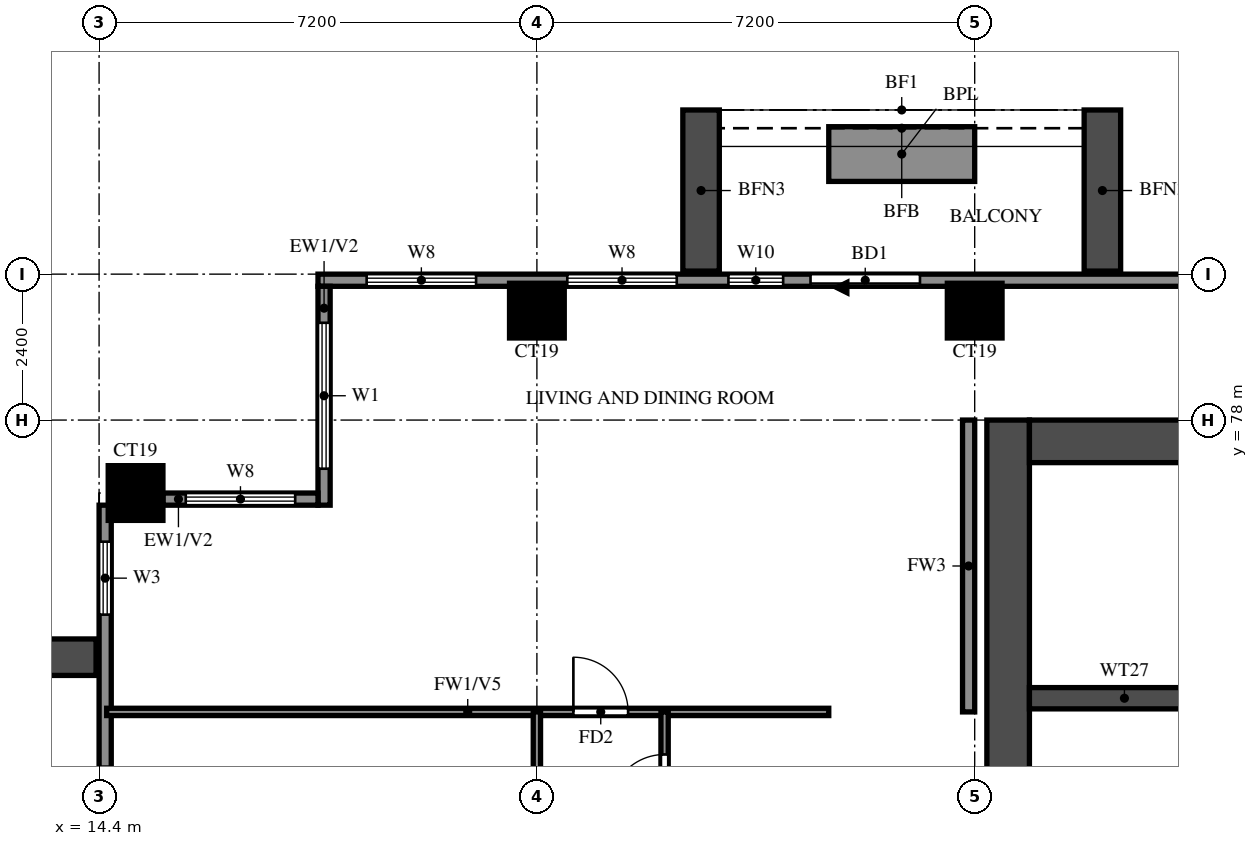
"""IFC4 building model, lengths in metres.
Left out: names, types, materials, properties, quantities, classifications, styles, units other than length and angle.
Written with IfcOpenShell. Run it as: python <this file> out.ifc"""

import sys

from ifc_helpers import new_model, si_unit, direction, frame, frame_2d, origin, origin_2d, place, context, subcontext, project, spatial, rectangle, extrude, source, transform, mapped, element, fill, save


model = new_model("IFC4")
c1 = context("Model", 3, precision=1e-05, world=origin(), true_north=direction((0.0, 1.0)))
c2 = subcontext(c1, "Body", "Model", "MODEL_VIEW")
j1 = project(units=[si_unit("LENGTHUNIT", "METRE"), si_unit("PLANEANGLEUNIT", "RADIAN")], contexts=[c1])
p1 = place(None, origin())
s1 = spatial("IfcSite", under=j1, at=p1, CompositionType="ELEMENT")
p2 = place(p1, origin())
s2 = spatial("IfcBuilding", under=s1, at=p2, CompositionType="ELEMENT")
p3 = place(p2, frame((0.0, 0.0, 123.5)))
s3 = spatial("IfcBuildingStorey", under=s2, at=p3, CompositionType="ELEMENT", Elevation=123.5)
m1 = source(origin(), c2, "Body", "SweptSolid", [
    extrude(rectangle(XDim=0.9, YDim=0.9, at=origin_2d()), origin(), (0.0, 0.0, 1.0), 3.2),
])
for number, where, z_axis, x_axis in (
    (1, (15.0, 76.8, 0.0), (0.0, 0.0, 1.0), (1.0, 0.0, 0.0)),
    (2, (21.6, 79.8, 0.0), (0.0, 0.0, 1.0), (1.0, 0.0, 0.0)),
    (3, (28.8, 79.8, 0.0), (0.0, 0.0, 1.0), (1.0, 0.0, 0.0)),
):
    element("IfcColumn", number, at=place(p3, frame(where, z_axis=z_axis, x_axis=x_axis)), inside=s3, PredefinedType="COLUMN", context=c2, shape_type="MappedRepresentation", body=[
        mapped(m1, transform((0.0, 0.0, 0.0))),
    ])
p4 = place(p3, frame((29.35, 66.1, 0.0), z_axis=(0.0, 0.0, 1.0), x_axis=(0.0, 1.0, 0.0)))
e4 = element("IfcWall", 4, at=p4, inside=s3, PredefinedType="SHEAR", context=c2, shape_type="SweptSolid", body=[
    extrude(rectangle(XDim=11.9, YDim=0.7, at=frame_2d((5.95, 0.0))), origin(), (0.0, 0.0, 1.0), 3.2),
])
p5 = place(p3, frame((29.7, 77.65, 0.0), z_axis=(0.0, 0.0, 1.0), x_axis=(1.0, 0.0, 0.0)))
e5 = element("IfcWall", 5, at=p5, inside=s3, PredefinedType="SHEAR", context=c2, shape_type="SweptSolid", body=[
    extrude(rectangle(XDim=41.4, YDim=0.7, at=frame_2d((20.7, 0.0))), origin(), (0.0, 0.0, 1.0), 3.2),
])
p6 = place(p3, frame((29.7, 73.425, 0.0), z_axis=(0.0, 0.0, 1.0), x_axis=(1.0, 0.0, 0.0)))
e6 = element("IfcWall", 6, at=p6, inside=s3, PredefinedType="SHEAR", context=c2, shape_type="SweptSolid", body=[
    extrude(rectangle(XDim=3.125, YDim=0.35, at=frame_2d((1.562, 0.0))), origin(), (0.0, 0.0, 1.0), 3.2),
])
p7 = place(p3, frame((82.6, 80.3, 0.0), z_axis=(0.0, 0.0, 1.0), x_axis=(-1.0, 0.0, 0.0)))
e7 = element("IfcWall", 7, at=p7, inside=s3, PredefinedType="SOLIDWALL", context=c2, shape_type="SweptSolid", body=[
    extrude(rectangle(XDim=64.6, YDim=0.2, at=frame_2d((32.3, 0.0))), origin(), (0.0, 0.0, 1.0), 3.2),
])
p8 = place(p7, frame((54.7, 0.0, 0.0)))
e8 = element("IfcOpeningElement", 8, at=p8, cuts=e7, PredefinedType="OPENING", context=c2, shape_type="SweptSolid", body=[
    extrude(rectangle(XDim=1.8, YDim=2.4, at=frame_2d((0.9, 1.2))), frame((0.0, 0.11, 0.0), z_axis=(0.0, -1.0, 0.0), x_axis=(1.0, 0.0, 0.0)), (0.0, 0.0, 1.0), 0.22),
])
p9 = place(p7, frame((56.95, 0.0, 0.6)))
e9 = element("IfcOpeningElement", 9, at=p9, cuts=e7, PredefinedType="OPENING", context=c2, shape_type="SweptSolid", body=[
    extrude(rectangle(XDim=0.9, YDim=2.4, at=frame_2d((0.45, 1.2))), frame((0.0, 0.11, 0.0), z_axis=(0.0, -1.0, 0.0), x_axis=(1.0, 0.0, 0.0)), (0.0, 0.0, 1.0), 0.22),
])
p10 = place(p7, frame((58.7, 0.0, 0.6)))
e10 = element("IfcOpeningElement", 10, at=p10, cuts=e7, PredefinedType="OPENING", context=c2, shape_type="SweptSolid", body=[
    extrude(rectangle(XDim=1.8, YDim=2.4, at=frame_2d((0.9, 1.2))), frame((0.0, 0.11, 0.0), z_axis=(0.0, -1.0, 0.0), x_axis=(1.0, 0.0, 0.0)), (0.0, 0.0, 1.0), 0.22),
])
p11 = place(p7, frame((62.0, 0.0, 0.6)))
e11 = element("IfcOpeningElement", 11, at=p11, cuts=e7, PredefinedType="OPENING", context=c2, shape_type="SweptSolid", body=[
    extrude(rectangle(XDim=1.8, YDim=2.4, at=frame_2d((0.9, 1.2))), frame((0.0, 0.11, 0.0), z_axis=(0.0, -1.0, 0.0), x_axis=(1.0, 0.0, 0.0)), (0.0, 0.0, 1.0), 0.22),
])
p12 = place(p7, frame((0.7, 0.0, 0.6)))
e12 = element("IfcOpeningElement", 12, at=p12, cuts=e7, PredefinedType="OPENING", context=c2, shape_type="SweptSolid", body=[
    extrude(rectangle(XDim=1.8, YDim=2.4, at=frame_2d((0.9, 1.2))), frame((0.0, 0.11, 0.0), z_axis=(0.0, -1.0, 0.0), x_axis=(1.0, 0.0, 0.0)), (0.0, 0.0, 1.0), 0.22),
])
p13 = place(p7, frame((4.367, 0.0, 0.6)))
e13 = element("IfcOpeningElement", 13, at=p13, cuts=e7, PredefinedType="OPENING", context=c2, shape_type="SweptSolid", body=[
    extrude(rectangle(XDim=2.4, YDim=2.4, at=frame_2d((1.2, 1.2))), frame((0.0, 0.11, 0.0), z_axis=(0.0, -1.0, 0.0), x_axis=(1.0, 0.0, 0.0)), (0.0, 0.0, 1.0), 0.22),
])
p14 = place(p7, frame((7.233, 0.0, 0.6)))
e14 = element("IfcOpeningElement", 14, at=p14, cuts=e7, PredefinedType="OPENING", context=c2, shape_type="SweptSolid", body=[
    extrude(rectangle(XDim=2.4, YDim=2.4, at=frame_2d((1.2, 1.2))), frame((0.0, 0.11, 0.0), z_axis=(0.0, -1.0, 0.0), x_axis=(1.0, 0.0, 0.0)), (0.0, 0.0, 1.0), 0.22),
])
p15 = place(p3, frame((18.1, 80.2, 0.0), z_axis=(0.0, 0.0, 1.0), x_axis=(0.0, -1.0, 0.0)))
e15 = element("IfcWall", 15, at=p15, inside=s3, PredefinedType="SOLIDWALL", context=c2, shape_type="SweptSolid", body=[
    extrude(rectangle(XDim=3.6, YDim=0.2, at=frame_2d((1.8, 0.0))), origin(), (0.0, 0.0, 1.0), 3.2),
])
p16 = place(p15, frame((0.6, 0.0, 0.6)))
e16 = element("IfcOpeningElement", 16, at=p16, cuts=e15, PredefinedType="OPENING", context=c2, shape_type="SweptSolid", body=[
    extrude(rectangle(XDim=2.4, YDim=2.4, at=frame_2d((1.2, 1.2))), frame((0.0, 0.11, 0.0), z_axis=(0.0, -1.0, 0.0), x_axis=(1.0, 0.0, 0.0)), (0.0, 0.0, 1.0), 0.22),
])
p17 = place(p3, frame((18.0, 76.7, 0.0), z_axis=(0.0, 0.0, 1.0), x_axis=(-1.0, 0.0, 0.0)))
e17 = element("IfcWall", 17, at=p17, inside=s3, PredefinedType="SOLIDWALL", context=c2, shape_type="SweptSolid", body=[
    extrude(rectangle(XDim=2.55, YDim=0.2, at=frame_2d((1.275, 0.0))), origin(), (0.0, 0.0, 1.0), 3.2),
])
p18 = place(p17, frame((0.375, 0.0, 0.6)))
e18 = element("IfcOpeningElement", 18, at=p18, cuts=e17, PredefinedType="OPENING", context=c2, shape_type="SweptSolid", body=[
    extrude(rectangle(XDim=1.8, YDim=2.4, at=frame_2d((0.9, 1.2))), frame((0.0, 0.11, 0.0), z_axis=(0.0, -1.0, 0.0), x_axis=(1.0, 0.0, 0.0)), (0.0, 0.0, 1.0), 0.22),
])
p19 = place(p3, frame((14.5, 76.6, 0.0), z_axis=(0.0, 0.0, 1.0), x_axis=(0.0, -1.0, 0.0)))
e19 = element("IfcWall", 19, at=p19, inside=s3, PredefinedType="SOLIDWALL", context=c2, shape_type="SweptSolid", body=[
    extrude(rectangle(XDim=33.4, YDim=0.2, at=frame_2d((16.7, 0.0))), origin(), (0.0, 0.0, 1.0), 3.2),
])
p20 = place(p19, frame((4.3, 0.0, 0.0)))
e20 = element("IfcOpeningElement", 20, at=p20, cuts=e19, PredefinedType="OPENING", context=c2, shape_type="SweptSolid", body=[
    extrude(rectangle(XDim=1.8, YDim=2.4, at=frame_2d((0.9, 1.2))), frame((0.0, 0.11, 0.0), z_axis=(0.0, -1.0, 0.0), x_axis=(1.0, 0.0, 0.0)), (0.0, 0.0, 1.0), 0.22),
])
p21 = place(p19, frame((18.7, 0.0, 0.0)))
e21 = element("IfcOpeningElement", 21, at=p21, cuts=e19, PredefinedType="OPENING", context=c2, shape_type="SweptSolid", body=[
    extrude(rectangle(XDim=1.8, YDim=2.4, at=frame_2d((0.9, 1.2))), frame((0.0, 0.11, 0.0), z_axis=(0.0, -1.0, 0.0), x_axis=(1.0, 0.0, 0.0)), (0.0, 0.0, 1.0), 0.22),
])
p22 = place(p19, frame((29.9, 0.0, 0.6)))
e22 = element("IfcOpeningElement", 22, at=p22, cuts=e19, PredefinedType="OPENING", context=c2, shape_type="SweptSolid", body=[
    extrude(rectangle(XDim=2.4, YDim=2.4, at=frame_2d((1.2, 1.2))), frame((0.0, 0.11, 0.0), z_axis=(0.0, -1.0, 0.0), x_axis=(1.0, 0.0, 0.0)), (0.0, 0.0, 1.0), 0.22),
])
p23 = place(p19, frame((22.05, 0.0, 0.6)))
e23 = element("IfcOpeningElement", 23, at=p23, cuts=e19, PredefinedType="OPENING", context=c2, shape_type="SweptSolid", body=[
    extrude(rectangle(XDim=0.9, YDim=2.4, at=frame_2d((0.45, 1.2))), frame((0.0, 0.11, 0.0), z_axis=(0.0, -1.0, 0.0), x_axis=(1.0, 0.0, 0.0)), (0.0, 0.0, 1.0), 0.22),
])
p24 = place(p19, frame((24.8, 0.0, 0.6)))
e24 = element("IfcOpeningElement", 24, at=p24, cuts=e19, PredefinedType="OPENING", context=c2, shape_type="SweptSolid", body=[
    extrude(rectangle(XDim=2.4, YDim=2.4, at=frame_2d((1.2, 1.2))), frame((0.0, 0.11, 0.0), z_axis=(0.0, -1.0, 0.0), x_axis=(1.0, 0.0, 0.0)), (0.0, 0.0, 1.0), 0.22),
])
p25 = place(p19, frame((15.0, 0.0, 0.6)))
e25 = element("IfcOpeningElement", 25, at=p25, cuts=e19, PredefinedType="OPENING", context=c2, shape_type="SweptSolid", body=[
    extrude(rectangle(XDim=1.2, YDim=2.4, at=frame_2d((0.6, 1.2))), frame((0.0, 0.11, 0.0), z_axis=(0.0, -1.0, 0.0), x_axis=(1.0, 0.0, 0.0)), (0.0, 0.0, 1.0), 0.22),
])
p26 = place(p19, frame((11.75, 0.0, 1.5)))
e26 = element("IfcOpeningElement", 26, at=p26, cuts=e19, PredefinedType="OPENING", context=c2, shape_type="SweptSolid", body=[
    extrude(rectangle(XDim=0.9, YDim=0.9, at=frame_2d((0.45, 0.45))), frame((0.0, 0.11, 0.0), z_axis=(0.0, -1.0, 0.0), x_axis=(1.0, 0.0, 0.0)), (0.0, 0.0, 1.0), 0.22),
])
p27 = place(p19, frame((7.5, 0.0, 0.6)))
e27 = element("IfcOpeningElement", 27, at=p27, cuts=e19, PredefinedType="OPENING", context=c2, shape_type="SweptSolid", body=[
    extrude(rectangle(XDim=1.2, YDim=2.4, at=frame_2d((0.6, 1.2))), frame((0.0, 0.11, 0.0), z_axis=(0.0, -1.0, 0.0), x_axis=(1.0, 0.0, 0.0)), (0.0, 0.0, 1.0), 0.22),
])
p28 = place(p19, frame((9.55, 0.0, 0.6)))
e28 = element("IfcOpeningElement", 28, at=p28, cuts=e19, PredefinedType="OPENING", context=c2, shape_type="SweptSolid", body=[
    extrude(rectangle(XDim=0.9, YDim=2.4, at=frame_2d((0.45, 1.2))), frame((0.0, 0.11, 0.0), z_axis=(0.0, -1.0, 0.0), x_axis=(1.0, 0.0, 0.0)), (0.0, 0.0, 1.0), 0.22),
])
p29 = place(p19, frame((0.6, 0.0, 0.6)))
e29 = element("IfcOpeningElement", 29, at=p29, cuts=e19, PredefinedType="OPENING", context=c2, shape_type="SweptSolid", body=[
    extrude(rectangle(XDim=1.2, YDim=2.4, at=frame_2d((0.6, 1.2))), frame((0.0, 0.11, 0.0), z_axis=(0.0, -1.0, 0.0), x_axis=(1.0, 0.0, 0.0)), (0.0, 0.0, 1.0), 0.22),
])
for number, where, z_axis, x_axis in (
    (30, (30.9, 80.45, 0.0), (0.0, 0.0, 1.0), (0.0, 1.0, 0.0)),
    (31, (24.3, 80.45, 0.0), (0.0, 0.0, 1.0), (0.0, 1.0, 0.0)),
):
    element("IfcWall", number, at=place(p3, frame(where, z_axis=z_axis, x_axis=x_axis)), inside=s3, PredefinedType="SOLIDWALL", context=c2, shape_type="SweptSolid", body=[
        extrude(rectangle(XDim=2.65, YDim=0.6, at=frame_2d((1.325, 0.0))), origin(), (0.0, 0.0, 1.0), 2.85),
    ])
p30 = place(p3, frame((28.8, 82.375, 0.0), z_axis=(0.0, 0.0, 1.0), x_axis=(-1.0, 0.0, 0.0)))
e32 = element("IfcWall", 32, at=p30, inside=s3, PredefinedType="SOLIDWALL", context=c2, shape_type="SweptSolid", body=[
    extrude(rectangle(XDim=2.4, YDim=0.9, at=frame_2d((1.2, 0.0))), origin(), (0.0, 0.0, 1.0), 0.9),
])
p31 = place(p3, frame((14.35, 74.1, 0.0), z_axis=(0.0, 0.0, 1.0), x_axis=(-1.0, 0.0, 0.0)))
e33 = element("IfcWall", 33, at=p31, inside=s3, PredefinedType="SOLIDWALL", context=c2, shape_type="SweptSolid", body=[
    extrude(rectangle(XDim=2.65, YDim=0.6, at=frame_2d((1.325, 0.0))), origin(), (0.0, 0.0, 1.0), 2.85),
])
p32 = place(p3, frame((28.7, 73.2, 0.0), z_axis=(0.0, 0.0, 1.0), x_axis=(0.0, 1.0, 0.0)))
e34 = element("IfcWall", 34, at=p32, inside=s3, PredefinedType="SOLIDWALL", context=c2, shape_type="SweptSolid", body=[
    extrude(rectangle(XDim=4.8, YDim=0.2, at=frame_2d((2.4, 0.0))), origin(), (0.0, 0.0, 1.0), 3.2),
])
p33 = place(p3, frame((14.525, 73.2, 0.0), z_axis=(0.0, 0.0, 1.0), x_axis=(1.0, 0.0, 0.0)))
e35 = element("IfcWall", 35, at=p33, inside=s3, PredefinedType="PARTITIONING", context=c2, shape_type="SweptSolid", body=[
    extrude(rectangle(XDim=11.875, YDim=0.12, at=frame_2d((5.938, 0.0))), origin(), (0.0, 0.0, 1.0), 2.3),
])
p34 = place(p33, frame((7.675, 0.0, 0.0)))
e36 = element("IfcOpeningElement", 36, at=p34, cuts=e35, PredefinedType="OPENING", context=c2, shape_type="SweptSolid", body=[
    extrude(rectangle(XDim=0.9, YDim=2.1, at=frame_2d((0.45, 1.05))), frame((0.0, 0.07, 0.0), z_axis=(0.0, -1.0, 0.0), x_axis=(1.0, 0.0, 0.0)), (0.0, 0.0, 1.0), 0.14),
])
p35 = place(p3, frame((21.6, 66.0, 0.0), z_axis=(0.0, 0.0, 1.0), x_axis=(0.0, 1.0, 0.0)))
e37 = element("IfcWall", 37, at=p35, inside=s3, PredefinedType="PARTITIONING", context=c2, shape_type="SweptSolid", body=[
    extrude(rectangle(XDim=7.2, YDim=0.12, at=frame_2d((3.6, 0.0))), origin(), (0.0, 0.0, 1.0), 3.2),
])
p36 = place(p35, frame((1.35, 0.0, 0.0)))
e38 = element("IfcOpeningElement", 38, at=p36, cuts=e37, PredefinedType="OPENING", context=c2, shape_type="SweptSolid", body=[
    extrude(rectangle(XDim=0.9, YDim=2.1, at=frame_2d((0.45, 1.05))), frame((0.0, 0.07, 0.0), z_axis=(0.0, -1.0, 0.0), x_axis=(1.0, 0.0, 0.0)), (0.0, 0.0, 1.0), 0.14),
])
p37 = place(p35, frame((4.95, 0.0, 0.0)))
e39 = element("IfcOpeningElement", 39, at=p37, cuts=e37, PredefinedType="OPENING", context=c2, shape_type="SweptSolid", body=[
    extrude(rectangle(XDim=0.9, YDim=2.1, at=frame_2d((0.45, 1.05))), frame((0.0, 0.07, 0.0), z_axis=(0.0, -1.0, 0.0), x_axis=(1.0, 0.0, 0.0)), (0.0, 0.0, 1.0), 0.14),
])
p38 = place(p3, frame((23.7, 61.2, 0.0), z_axis=(0.0, 0.0, 1.0), x_axis=(0.0, 1.0, 0.0)))
e40 = element("IfcWall", 40, at=p38, inside=s3, PredefinedType="PARTITIONING", context=c2, shape_type="SweptSolid", body=[
    extrude(rectangle(XDim=12.0, YDim=0.12, at=frame_2d((6.0, 0.0))), origin(), (0.0, 0.0, 1.0), 3.2),
])
p39 = place(p38, frame((1.875, 0.0, 0.0)))
e41 = element("IfcOpeningElement", 41, at=p39, cuts=e40, PredefinedType="OPENING", context=c2, shape_type="SweptSolid", body=[
    extrude(rectangle(XDim=0.9, YDim=2.1, at=frame_2d((0.45, 1.05))), frame((0.0, 0.07, 0.0), z_axis=(0.0, -1.0, 0.0), x_axis=(1.0, 0.0, 0.0)), (0.0, 0.0, 1.0), 0.14),
])
p40 = place(p38, frame((5.45, 0.0, 0.0)))
e42 = element("IfcOpeningElement", 42, at=p40, cuts=e40, PredefinedType="OPENING", context=c2, shape_type="SweptSolid", body=[
    extrude(rectangle(XDim=0.8, YDim=2.1, at=frame_2d((0.4, 1.05))), frame((0.0, 0.07, 0.0), z_axis=(0.0, -1.0, 0.0), x_axis=(1.0, 0.0, 0.0)), (0.0, 0.0, 1.0), 0.14),
])
p41 = place(p38, frame((7.975, 0.0, 0.0)))
e43 = element("IfcOpeningElement", 43, at=p41, cuts=e40, PredefinedType="OPENING", context=c2, shape_type="SweptSolid", body=[
    extrude(rectangle(XDim=0.8, YDim=2.1, at=frame_2d((0.4, 1.05))), frame((0.0, 0.07, 0.0), z_axis=(0.0, -1.0, 0.0), x_axis=(1.0, 0.0, 0.0)), (0.0, 0.0, 1.0), 0.14),
])
p42 = place(p38, frame((10.4, 0.0, 0.0)))
e44 = element("IfcOpeningElement", 44, at=p42, cuts=e40, PredefinedType="OPENING", context=c2, shape_type="SweptSolid", body=[
    extrude(rectangle(XDim=0.9, YDim=2.1, at=frame_2d((0.45, 1.05))), frame((0.0, 0.07, 0.0), z_axis=(0.0, -1.0, 0.0), x_axis=(1.0, 0.0, 0.0)), (0.0, 0.0, 1.0), 0.14),
])
p43 = place(p8, origin())
e45 = element("IfcDoor", 45, at=p43, inside=s3, OperationType="DOUBLE_DOOR_SLIDING", PredefinedType="DOOR", context=c2, shape_type="SweptSolid", body=[
    extrude(rectangle(XDim=1.8, YDim=2.4, at=frame_2d((0.9, 1.2))), frame((0.0, 0.025, 0.0), z_axis=(0.0, -1.0, 0.0), x_axis=(1.0, 0.0, 0.0)), (0.0, 0.0, 1.0), 0.05),
])
fill(e8, e45)
p44 = place(p9, origin())
e46 = element("IfcWindow", 46, at=p44, inside=s3, PartitioningType="SINGLE_PANEL", PredefinedType="WINDOW", context=c2, shape_type="SweptSolid", body=[
    extrude(rectangle(XDim=0.9, YDim=2.4, at=frame_2d((0.45, 1.2))), frame((0.0, 0.03, 0.0), z_axis=(0.0, -1.0, 0.0), x_axis=(1.0, 0.0, 0.0)), (0.0, 0.0, 1.0), 0.06),
])
fill(e9, e46)
p45 = place(p10, origin())
e47 = element("IfcWindow", 47, at=p45, inside=s3, PartitioningType="DOUBLE_PANEL_VERTICAL", PredefinedType="WINDOW", context=c2, shape_type="SweptSolid", body=[
    extrude(rectangle(XDim=1.8, YDim=2.4, at=frame_2d((0.9, 1.2))), frame((0.0, 0.03, 0.0), z_axis=(0.0, -1.0, 0.0), x_axis=(1.0, 0.0, 0.0)), (0.0, 0.0, 1.0), 0.06),
])
fill(e10, e47)
p46 = place(p11, origin())
e48 = element("IfcWindow", 48, at=p46, inside=s3, PartitioningType="DOUBLE_PANEL_VERTICAL", PredefinedType="WINDOW", context=c2, shape_type="SweptSolid", body=[
    extrude(rectangle(XDim=1.8, YDim=2.4, at=frame_2d((0.9, 1.2))), frame((0.0, 0.03, 0.0), z_axis=(0.0, -1.0, 0.0), x_axis=(1.0, 0.0, 0.0)), (0.0, 0.0, 1.0), 0.06),
])
fill(e11, e48)
p47 = place(p16, origin())
e49 = element("IfcWindow", 49, at=p47, inside=s3, PartitioningType="DOUBLE_PANEL_VERTICAL", PredefinedType="WINDOW", context=c2, shape_type="SweptSolid", body=[
    extrude(rectangle(XDim=2.4, YDim=2.4, at=frame_2d((1.2, 1.2))), frame((0.0, 0.03, 0.0), z_axis=(0.0, -1.0, 0.0), x_axis=(1.0, 0.0, 0.0)), (0.0, 0.0, 1.0), 0.06),
])
fill(e16, e49)
p48 = place(p18, origin())
e50 = element("IfcWindow", 50, at=p48, inside=s3, PartitioningType="DOUBLE_PANEL_VERTICAL", PredefinedType="WINDOW", context=c2, shape_type="SweptSolid", body=[
    extrude(rectangle(XDim=1.8, YDim=2.4, at=frame_2d((0.9, 1.2))), frame((0.0, 0.03, 0.0), z_axis=(0.0, -1.0, 0.0), x_axis=(1.0, 0.0, 0.0)), (0.0, 0.0, 1.0), 0.06),
])
fill(e18, e50)
p49 = place(p20, origin())
e51 = element("IfcDoor", 51, at=p49, inside=s3, OperationType="DOUBLE_DOOR_SLIDING", PredefinedType="DOOR", context=c2, shape_type="SweptSolid", body=[
    extrude(rectangle(XDim=1.8, YDim=2.4, at=frame_2d((0.9, 1.2))), frame((0.0, 0.025, 0.0), z_axis=(0.0, -1.0, 0.0), x_axis=(1.0, 0.0, 0.0)), (0.0, 0.0, 1.0), 0.05),
])
fill(e20, e51)
p50 = place(p29, origin())
e52 = element("IfcWindow", 52, at=p50, inside=s3, PartitioningType="SINGLE_PANEL", PredefinedType="WINDOW", context=c2, shape_type="SweptSolid", body=[
    extrude(rectangle(XDim=1.2, YDim=2.4, at=frame_2d((0.6, 1.2))), frame((0.0, 0.03, 0.0), z_axis=(0.0, -1.0, 0.0), x_axis=(1.0, 0.0, 0.0)), (0.0, 0.0, 1.0), 0.06),
])
fill(e29, e52)
p51 = place(p34, origin())
e53 = element("IfcDoor", 53, at=p51, inside=s3, OperationType="SINGLE_SWING_LEFT", PredefinedType="DOOR", context=c2, shape_type="SweptSolid", body=[
    extrude(rectangle(XDim=0.9, YDim=2.1, at=frame_2d((0.45, 1.05))), frame((0.0, 0.025, 0.0), z_axis=(0.0, -1.0, 0.0), x_axis=(1.0, 0.0, 0.0)), (0.0, 0.0, 1.0), 0.05),
])
fill(e36, e53)
p52 = place(p42, origin())
e54 = element("IfcDoor", 54, at=p52, inside=s3, OperationType="SINGLE_SWING_LEFT", PredefinedType="DOOR", context=c2, shape_type="SweptSolid", body=[
    extrude(rectangle(XDim=0.9, YDim=2.1, at=frame_2d((0.45, 1.05))), frame((0.0, 0.025, 0.0), z_axis=(0.0, -1.0, 0.0), x_axis=(1.0, 0.0, 0.0)), (0.0, 0.0, 1.0), 0.05),
])
fill(e44, e54)
save(model, sys.argv[1])
